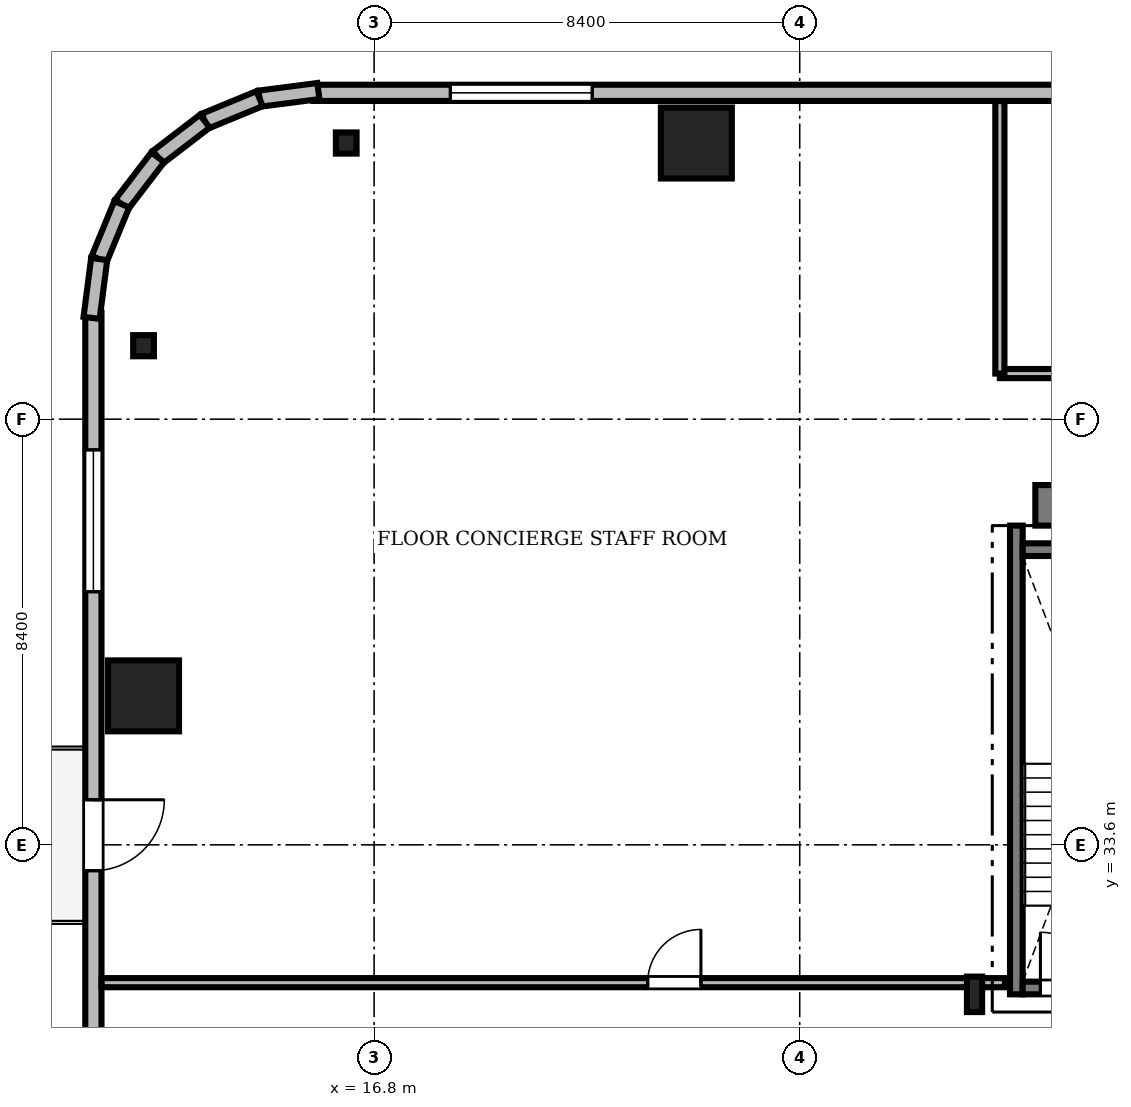
"""IFC4 building model, lengths in metres.
Left out: names, types, materials, properties, quantities, classifications, styles, units other than length and angle.
Written with IfcOpenShell. Run it as: python <this file> out.ifc"""

import sys

from ifc_helpers import new_model, si_unit, direction, frame, frame_2d, origin, origin_2d, place, context, subcontext, project, spatial, rectangle, i_section, extrude, source, transform, mapped, element, fill, save


model = new_model("IFC4")
c1 = context("Model", 3, precision=1e-05, world=origin(), true_north=direction((0.0, 1.0)))
c2 = subcontext(c1, "Body", "Model", "MODEL_VIEW")
j1 = project(units=[si_unit("LENGTHUNIT", "METRE"), si_unit("PLANEANGLEUNIT", "RADIAN")], contexts=[c1])
p1 = place(None, origin())
s1 = spatial("IfcSite", under=j1, at=p1, CompositionType="ELEMENT")
p2 = place(p1, origin())
s2 = spatial("IfcBuilding", under=s1, at=p2, CompositionType="ELEMENT")
p3 = place(p2, frame((0.0, 0.0, 203.55)))
s3 = spatial("IfcBuildingStorey", under=s2, at=p3, CompositionType="ELEMENT", Elevation=203.55)
m1 = source(origin(), c2, "Body", "SweptSolid", [
    extrude(rectangle(XDim=17.52, YDim=0.8, at=frame_2d((8.76, 0.0))), origin(), (0.0, 0.0, 1.0), 3.53),
])
p4 = place(p3, frame((29.85, 40.3, 0.0), z_axis=(0.0, 0.0, 1.0), x_axis=(1.0, 0.0, 0.0)))
e1 = element("IfcWall", 1, at=p4, inside=s3, PredefinedType="SHEAR", context=c2, shape_type="MappedRepresentation", body=[
    mapped(m1, transform((0.0, 0.0, 0.0), scale=1.0)),
])
m2 = source(origin(), c2, "Body", "SweptSolid", [
    extrude(i_section(OverallWidth=0.3, OverallDepth=0.7, WebThickness=0.017, FlangeThickness=0.032, FilletRadius=0.027, at=origin_2d()), origin(), (0.0, 0.0, 1.0), 3.53),
])
p5 = place(p3, frame((28.65, 30.65, 0.0), z_axis=(0.0, 0.0, 1.0), x_axis=(1.0, 0.0, 0.0)))
e2 = element("IfcColumn", 2, at=p5, inside=s3, PredefinedType="COLUMN", context=c2, shape_type="MappedRepresentation", body=[
    mapped(m2, transform((0.0, 0.0, 0.0), scale=1.0)),
])
m3 = source(origin(), c2, "Body", "SweptSolid", [
    extrude(rectangle(XDim=1.4, YDim=1.4, at=origin_2d()), origin(), (0.0, 0.0, 1.0), 3.53),
])
for number, where, z_axis, x_axis in (
    (3, (23.16, 47.45, 0.0), (0.0, 0.0, 1.0), (1.0, 0.0, 0.0)),
    (4, (12.25, 36.54, 0.0), (0.0, 0.0, 1.0), (1.0, 0.0, 0.0)),
):
    element("IfcColumn", number, at=place(p3, frame(where, z_axis=z_axis, x_axis=x_axis)), inside=s3, PredefinedType="COLUMN", context=c2, shape_type="MappedRepresentation", body=[
        mapped(m3, transform((0.0, 0.0, 0.0), scale=1.0)),
    ])
m4 = source(origin(), c2, "Body", "SweptSolid", [
    extrude(i_section(OverallWidth=0.409, OverallDepth=0.417, WebThickness=0.021, FlangeThickness=0.033, FilletRadius=0.015, at=origin_2d()), origin(), (0.0, 0.0, 1.0), 3.53),
])
for number, where, z_axis, x_axis in (
    (5, (16.25, 47.45, 0.0), (0.0, 0.0, 1.0), (1.0, 0.0, 0.0)),
    (6, (12.25, 43.45, 0.0), (0.0, 0.0, 1.0), (1.0, 0.0, 0.0)),
):
    element("IfcColumn", number, at=place(p3, frame(where, z_axis=z_axis, x_axis=x_axis)), inside=s3, PredefinedType="COLUMN", context=c2, shape_type="MappedRepresentation", body=[
        mapped(m4, transform((0.0, 0.0, 0.0), scale=1.0)),
    ])
m5 = source(origin(), c2, "Body", "SweptSolid", [
    extrude(rectangle(XDim=15.6, YDim=0.32, at=frame_2d((7.8, 0.0))), origin(), (0.0, 0.0, 1.0), 3.53),
])
p6 = place(p3, frame((31.2, 48.44, 0.0), z_axis=(0.0, 0.0, 1.0), x_axis=(-1.0, 0.0, 0.0)))
e7 = element("IfcWall", 7, at=p6, inside=s3, PredefinedType="SOLIDWALL", context=c2, shape_type="MappedRepresentation", body=[
    mapped(m5, transform((0.0, 0.0, 0.0), scale=1.0)),
])
m6 = source(origin(), c2, "Body", "SweptSolid", [
    extrude(rectangle(XDim=2.8, YDim=2.4, at=frame_2d((1.4, 1.2))), frame((0.0, 0.17, 0.0), z_axis=(0.0, -1.0, 0.0), x_axis=(1.0, 0.0, 0.0)), (0.0, 0.0, 1.0), 0.34),
])
p7 = place(p6, frame((10.095, 0.0, 0.72)))
e8 = element("IfcOpeningElement", 8, at=p7, cuts=e7, PredefinedType="OPENING", context=c2, shape_type="MappedRepresentation", body=[
    mapped(m6, transform((0.0, 0.0, 0.0), scale=1.0)),
])
m7 = source(origin(), c2, "Body", "SweptSolid", [
    extrude(rectangle(XDim=15.6, YDim=0.32, at=frame_2d((7.8, 0.0))), origin(), (0.0, 0.0, 1.0), 3.53),
])
p8 = place(p3, frame((11.26, 44.1, 0.0), z_axis=(0.0, 0.0, 1.0), x_axis=(0.0, -1.0, 0.0)))
e9 = element("IfcWall", 9, at=p8, inside=s3, PredefinedType="SOLIDWALL", context=c2, shape_type="MappedRepresentation", body=[
    mapped(m7, transform((0.0, 0.0, 0.0), scale=1.0)),
])
m8 = source(origin(), c2, "Body", "SweptSolid", [
    extrude(rectangle(XDim=1.4, YDim=2.3, at=frame_2d((0.7, 1.15))), frame((0.0, 0.17, 0.0), z_axis=(0.0, -1.0, 0.0), x_axis=(1.0, 0.0, 0.0)), (0.0, 0.0, 1.0), 0.34),
])
p9 = place(p8, frame((9.61, 0.0, 0.0)))
e10 = element("IfcOpeningElement", 10, at=p9, cuts=e9, PredefinedType="OPENING", context=c2, shape_type="MappedRepresentation", body=[
    mapped(m8, transform((0.0, 0.0, 0.0), scale=1.0)),
])
p10 = place(p8, frame((2.705, 0.0, 0.72)))
e11 = element("IfcOpeningElement", 11, at=p10, cuts=e9, PredefinedType="OPENING", context=c2, shape_type="MappedRepresentation", body=[
    mapped(m6, transform((0.0, 0.0, 0.0), scale=1.0)),
])
m9 = source(origin(), c2, "Body", "SweptSolid", [
    extrude(rectangle(XDim=1.17, YDim=0.32, at=frame_2d((0.585, 0.0))), origin(), (0.0, 0.0, 1.0), 3.53),
])
p11 = place(p3, frame((15.7, 48.476, 0.0), z_axis=(0.0, 0.0, 1.0), x_axis=(-0.991735963317, -0.128295670475, 0.0)))
e12 = element("IfcWall", 12, at=p11, inside=s3, PredefinedType="SOLIDWALL", context=c2, shape_type="MappedRepresentation", body=[
    mapped(m9, transform((0.0, 0.0, 0.0), scale=1.0)),
])
m10 = source(origin(), c2, "Body", "SweptSolid", [
    extrude(rectangle(XDim=1.169, YDim=0.32, at=frame_2d((0.584, 0.0))), origin(), (0.0, 0.0, 1.0), 3.53),
])
p12 = place(p3, frame((14.54, 48.325, 0.0), z_axis=(0.0, 0.0, 1.0), x_axis=(-0.924552646638, -0.381054331552, 0.0)))
e13 = element("IfcWall", 13, at=p12, inside=s3, PredefinedType="SOLIDWALL", context=c2, shape_type="MappedRepresentation", body=[
    mapped(m10, transform((0.0, 0.0, 0.0), scale=1.0)),
])
m11 = source(origin(), c2, "Body", "SweptSolid", [
    extrude(rectangle(XDim=1.169, YDim=0.32, at=frame_2d((0.584, 0.0))), origin(), (0.0, 0.0, 1.0), 3.53),
])
p13 = place(p3, frame((13.459, 47.88, 0.0), z_axis=(0.0, 0.0, 1.0), x_axis=(-0.793663520347, -0.608356981114, 0.0)))
e14 = element("IfcWall", 14, at=p13, inside=s3, PredefinedType="SOLIDWALL", context=c2, shape_type="MappedRepresentation", body=[
    mapped(m11, transform((0.0, 0.0, 0.0), scale=1.0)),
])
m12 = source(origin(), c2, "Body", "SweptSolid", [
    extrude(rectangle(XDim=1.169, YDim=0.32, at=frame_2d((0.584, 0.0))), origin(), (0.0, 0.0, 1.0), 3.53),
])
p14 = place(p3, frame((12.531, 47.169, 0.0), z_axis=(0.0, 0.0, 1.0), x_axis=(-0.608387696831, -0.793639975269, 0.0)))
e15 = element("IfcWall", 15, at=p14, inside=s3, PredefinedType="SOLIDWALL", context=c2, shape_type="MappedRepresentation", body=[
    mapped(m12, transform((0.0, 0.0, 0.0), scale=1.0)),
])
p15 = place(p3, frame((11.82, 46.241, 0.0), z_axis=(0.0, 0.0, 1.0), x_axis=(-0.381054331552, -0.924552646638, 0.0)))
e16 = element("IfcWall", 16, at=p15, inside=s3, PredefinedType="SOLIDWALL", context=c2, shape_type="MappedRepresentation", body=[
    mapped(m10, transform((0.0, 0.0, 0.0), scale=1.0)),
])
p16 = place(p3, frame((11.375, 45.16, 0.0), z_axis=(0.0, 0.0, 1.0), x_axis=(-0.128295670475, -0.991735963317, 0.0)))
e17 = element("IfcWall", 17, at=p16, inside=s3, PredefinedType="SOLIDWALL", context=c2, shape_type="MappedRepresentation", body=[
    mapped(m9, transform((0.0, 0.0, 0.0), scale=1.0)),
])
m13 = source(origin(), c2, "Body", "SweptSolid", [
    extrude(rectangle(XDim=9.25, YDim=0.25, at=frame_2d((4.625, 0.0))), origin(), (0.0, 0.0, 1.0), 3.55),
])
p17 = place(p3, frame((29.475, 30.65, 0.0), z_axis=(0.0, 0.0, 1.0), x_axis=(0.0, 1.0, 0.0)))
e18 = element("IfcWall", 18, at=p17, inside=s3, PredefinedType="SOLIDWALL", context=c2, shape_type="MappedRepresentation", body=[
    mapped(m13, transform((0.0, 0.0, 0.0), scale=1.0)),
])
m14 = source(origin(), c2, "Body", "SweptSolid", [
    extrude(rectangle(XDim=3.15, YDim=0.25, at=frame_2d((1.575, 0.0))), origin(), (0.0, 0.0, 1.0), 3.55),
])
p18 = place(p3, frame((29.6, 39.425, 0.0), z_axis=(0.0, 0.0, 1.0), x_axis=(1.0, 0.0, 0.0)))
e19 = element("IfcWall", 19, at=p18, inside=s3, PredefinedType="SOLIDWALL", context=c2, shape_type="MappedRepresentation", body=[
    mapped(m14, transform((0.0, 0.0, 0.0), scale=1.0)),
])
p19 = place(p3, frame((29.6, 30.775, 0.0), z_axis=(0.0, 0.0, 1.0), x_axis=(1.0, 0.0, 0.0)))
e20 = element("IfcWall", 20, at=p19, inside=s3, PredefinedType="SOLIDWALL", context=c2, shape_type="MappedRepresentation", body=[
    mapped(m14, transform((0.0, 0.0, 0.0), scale=1.0)),
])
m15 = source(origin(), c2, "Body", "SweptSolid", [
    extrude(rectangle(XDim=1.1, YDim=2.2, at=frame_2d((0.55, 1.1))), frame((0.0, 0.135, 0.0), z_axis=(0.0, -1.0, 0.0), x_axis=(1.0, 0.0, 0.0)), (0.0, 0.0, 1.0), 0.27),
])
p20 = place(p19, frame((0.35, 0.0, 0.0)))
e21 = element("IfcOpeningElement", 21, at=p20, cuts=e20, PredefinedType="OPENING", context=c2, shape_type="MappedRepresentation", body=[
    mapped(m15, transform((0.0, 0.0, 0.0), scale=1.0)),
])
m16 = source(origin(), c2, "Body", "SweptSolid", [
    extrude(rectangle(XDim=28.428, YDim=0.18, at=frame_2d((14.214, 0.0))), origin(), (0.0, 0.0, 1.0), 2.772),
])
p21 = place(p3, frame((29.15, 42.9, 0.0), z_axis=(0.0, 0.0, 1.0), x_axis=(1.0, 0.0, 0.0)))
e22 = element("IfcWall", 22, at=p21, inside=s3, PredefinedType="PARTITIONING", context=c2, shape_type="MappedRepresentation", body=[
    mapped(m16, transform((0.0, 0.0, 0.0), scale=1.0)),
])
m17 = source(origin(), c2, "Body", "SweptSolid", [
    extrude(rectangle(XDim=1.05, YDim=2.2, at=frame_2d((0.525, 1.1))), frame((0.0, 0.1, 0.0), z_axis=(0.0, -1.0, 0.0), x_axis=(1.0, 0.0, 0.0)), (0.0, 0.0, 1.0), 0.2),
])
p22 = place(p21, frame((4.5, 0.0, 0.0)))
e23 = element("IfcOpeningElement", 23, at=p22, cuts=e22, PredefinedType="OPENING", context=c2, shape_type="MappedRepresentation", body=[
    mapped(m17, transform((0.0, 0.0, 0.0), scale=1.0)),
])
m18 = source(origin(), c2, "Body", "SweptSolid", [
    extrude(rectangle(XDim=17.828, YDim=0.18, at=frame_2d((8.914, 0.0))), origin(), (0.0, 0.0, 1.0), 2.772),
])
p23 = place(p3, frame((11.422, 30.88, 0.0), z_axis=(0.0, 0.0, 1.0), x_axis=(1.0, 0.0, 0.0)))
e24 = element("IfcWall", 24, at=p23, inside=s3, PredefinedType="PARTITIONING", context=c2, shape_type="MappedRepresentation", body=[
    mapped(m18, transform((0.0, 0.0, 0.0), scale=1.0)),
])
p24 = place(p23, frame((10.778, 0.0, 0.0)))
e25 = element("IfcOpeningElement", 25, at=p24, cuts=e24, PredefinedType="OPENING", context=c2, shape_type="MappedRepresentation", body=[
    mapped(m17, transform((0.0, 0.0, 0.0), scale=1.0)),
])
m19 = source(origin(), c2, "Body", "SweptSolid", [
    extrude(rectangle(XDim=5.378, YDim=0.18, at=frame_2d((2.689, 0.0))), origin(), (0.0, 0.0, 1.0), 2.772),
])
p25 = place(p3, frame((29.15, 42.9, 0.0), z_axis=(0.0, 0.0, 1.0), x_axis=(0.0, 1.0, 0.0)))
e26 = element("IfcWall", 26, at=p25, inside=s3, PredefinedType="PARTITIONING", context=c2, shape_type="MappedRepresentation", body=[
    mapped(m19, transform((0.0, 0.0, 0.0), scale=1.0)),
])
m20 = source(origin(), c2, "Body", "SweptSolid", [
    extrude(rectangle(XDim=2.8, YDim=2.4, at=frame_2d((1.4, 1.2))), frame((0.0, 0.03, 0.0), z_axis=(0.0, -1.0, 0.0), x_axis=(1.0, 0.0, 0.0)), (0.0, 0.0, 1.0), 0.06),
])
p26 = place(p7, origin())
e27 = element("IfcWindow", 27, at=p26, inside=s3, PartitioningType="SINGLE_PANEL", PredefinedType="WINDOW", context=c2, shape_type="MappedRepresentation", body=[
    mapped(m20, transform((0.0, 0.0, 0.0), scale=1.0)),
])
fill(e8, e27)
m21 = source(origin(), c2, "Body", "SweptSolid", [
    extrude(rectangle(XDim=1.4, YDim=2.3, at=frame_2d((0.7, 1.15))), frame((0.0, 0.025, 0.0), z_axis=(0.0, -1.0, 0.0), x_axis=(1.0, 0.0, 0.0)), (0.0, 0.0, 1.0), 0.05),
])
p27 = place(p9, frame((1.4, 0.0, 0.0), z_axis=(0.0, 0.0, 1.0), x_axis=(-1.0, 0.0, 0.0)))
e28 = element("IfcDoor", 28, at=p27, inside=s3, OperationType="DOUBLE_DOOR_SLIDING", PredefinedType="DOOR", context=c2, shape_type="MappedRepresentation", body=[
    mapped(m21, transform((0.0, 0.0, 0.0), scale=1.0)),
])
fill(e10, e28)
p28 = place(p10, origin())
e29 = element("IfcWindow", 29, at=p28, inside=s3, PartitioningType="SINGLE_PANEL", PredefinedType="WINDOW", context=c2, shape_type="MappedRepresentation", body=[
    mapped(m20, transform((0.0, 0.0, 0.0), scale=1.0)),
])
fill(e11, e29)
m22 = source(origin(), c2, "Body", "SweptSolid", [
    extrude(rectangle(XDim=1.1, YDim=2.2, at=frame_2d((0.55, 1.1))), frame((0.0, 0.025, 0.0), z_axis=(0.0, -1.0, 0.0), x_axis=(1.0, 0.0, 0.0)), (0.0, 0.0, 1.0), 0.05),
])
p29 = place(p20, origin())
e30 = element("IfcDoor", 30, at=p29, inside=s3, OperationType="SINGLE_SWING_LEFT", PredefinedType="DOOR", context=c2, shape_type="MappedRepresentation", body=[
    mapped(m22, transform((0.0, 0.0, 0.0), scale=1.0)),
])
fill(e21, e30)
m23 = source(origin(), c2, "Body", "SweptSolid", [
    extrude(rectangle(XDim=1.05, YDim=2.2, at=frame_2d((0.525, 1.1))), frame((0.0, 0.025, 0.0), z_axis=(0.0, -1.0, 0.0), x_axis=(1.0, 0.0, 0.0)), (0.0, 0.0, 1.0), 0.05),
])
p30 = place(p24, origin())
e31 = element("IfcDoor", 31, at=p30, inside=s3, OperationType="SINGLE_SWING_RIGHT", PredefinedType="DOOR", context=c2, shape_type="MappedRepresentation", body=[
    mapped(m23, transform((0.0, 0.0, 0.0), scale=1.0)),
])
fill(e25, e31)
save(model, sys.argv[1])
